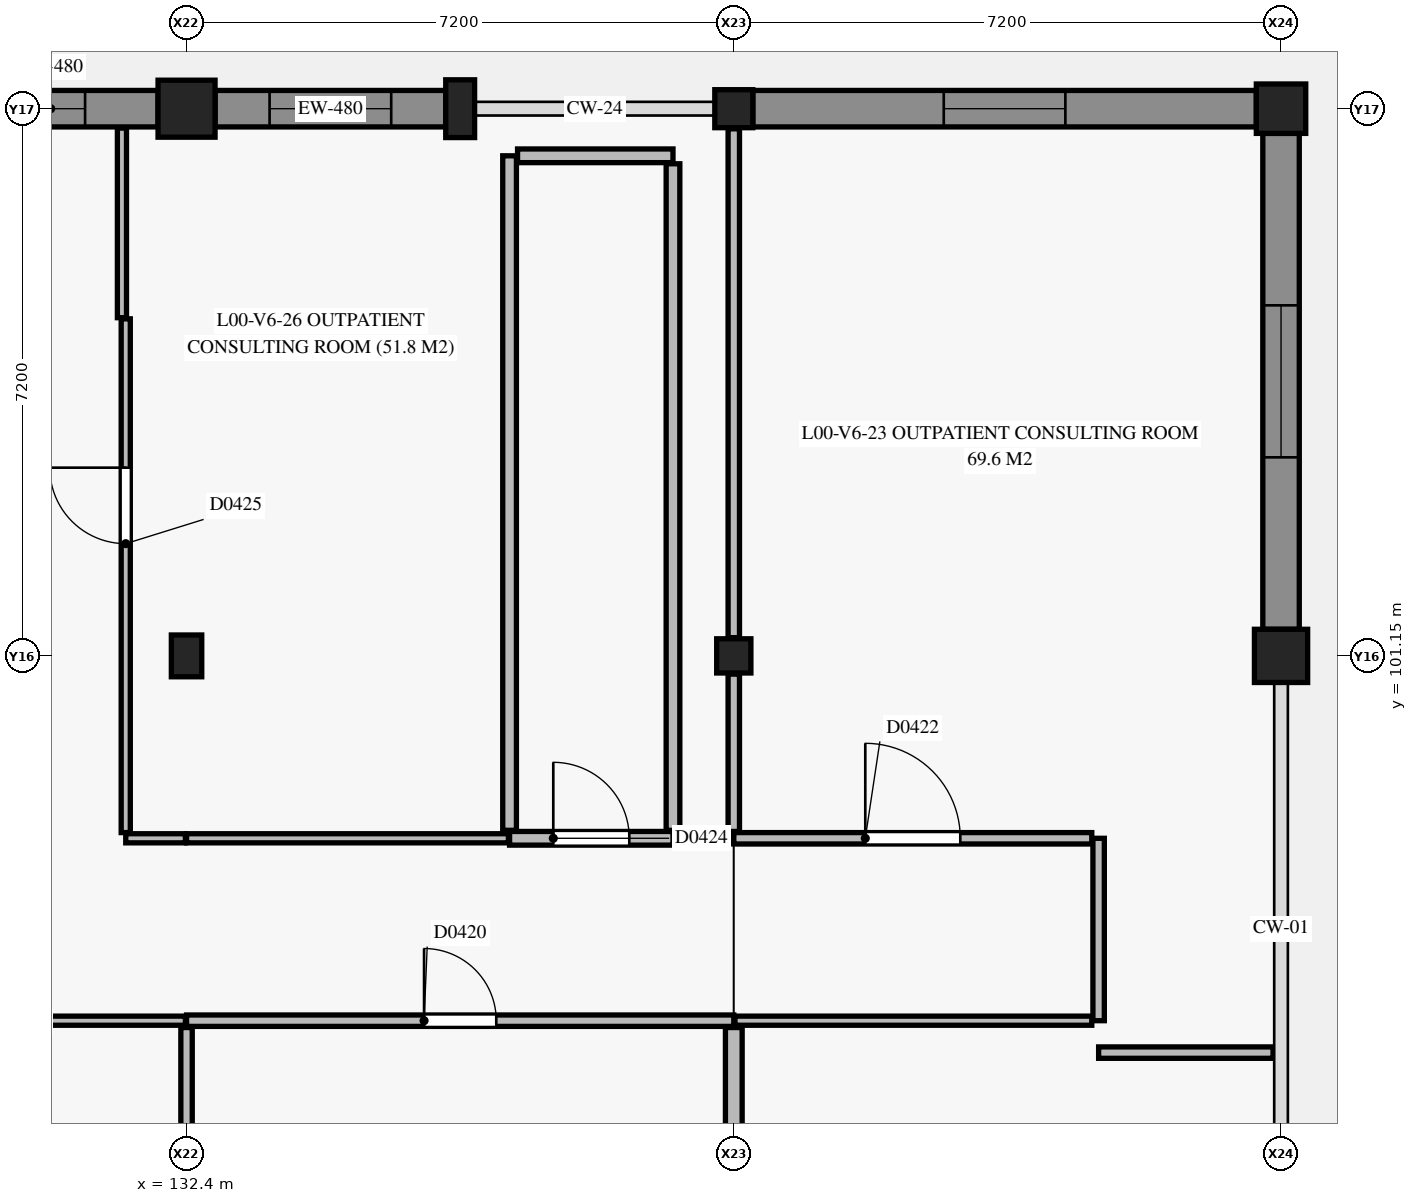
"""IFC4 building model, lengths in metres.
Left out: names, types, materials, properties, quantities, classifications, styles, units other than length and angle.
Written with IfcOpenShell. Run it as: python <this file> out.ifc"""

import sys

from ifc_helpers import new_model, si_unit, direction, frame, frame_2d, origin, origin_2d, place, context, subcontext, project, spatial, rectangle, circle, extrude, element, fill, save


model = new_model("IFC4")
c1 = context("Model", 3, precision=1e-05, world=origin(), true_north=direction((0.0, 1.0)))
c2 = subcontext(c1, "Body", "Model", "MODEL_VIEW")
j1 = project(units=[si_unit("LENGTHUNIT", "METRE"), si_unit("PLANEANGLEUNIT", "RADIAN")], contexts=[c1])
p1 = place(None, origin())
s1 = spatial("IfcSite", under=j1, at=p1, CompositionType="ELEMENT")
p2 = place(p1, origin())
s2 = spatial("IfcBuilding", under=s1, at=p2, CompositionType="ELEMENT")
p3 = place(p2, origin())
s3 = spatial("IfcBuildingStorey", under=s2, at=p3, CompositionType="ELEMENT", Elevation=0.0)
p4 = place(p3, frame((132.4, 101.15, 0.0), z_axis=(0.0, 0.0, 1.0), x_axis=(1.0, 0.0, 0.0)))
e1 = element("IfcColumn", 1, at=p4, inside=s3, PredefinedType="COLUMN", context=c2, shape_type="SweptSolid", body=[
    extrude(rectangle(XDim=0.4, YDim=0.55, at=origin_2d()), origin(), (0.0, 0.0, 1.0), 4.8),
])
p5 = place(p3, frame((132.4, 108.35, 0.0), z_axis=(0.0, 0.0, 1.0), x_axis=(1.0, 0.0, 0.0)))
e2 = element("IfcColumn", 2, at=p5, inside=s3, PredefinedType="COLUMN", context=c2, shape_type="SweptSolid", body=[
    extrude(rectangle(XDim=0.75, YDim=0.75, at=origin_2d()), origin(), (0.0, 0.0, 1.0), 4.8),
])
p6 = place(p3, frame((139.6, 101.15, 0.0), z_axis=(0.0, 0.0, 1.0), x_axis=(1.0, 0.0, 0.0)))
e3 = element("IfcColumn", 3, at=p6, inside=s3, PredefinedType="COLUMN", context=c2, shape_type="SweptSolid", body=[
    extrude(rectangle(XDim=0.45, YDim=0.45, at=origin_2d()), origin(), (0.0, 0.0, 1.0), 4.8),
])
p7 = place(p3, frame((139.6, 108.35, 0.0), z_axis=(0.0, 0.0, 1.0), x_axis=(1.0, 0.0, 0.0)))
e4 = element("IfcColumn", 4, at=p7, inside=s3, PredefinedType="COLUMN", context=c2, shape_type="SweptSolid", body=[
    extrude(circle(Radius=0.25, at=origin_2d()), origin(), (0.0, 0.0, 1.0), 4.8),
])
p8 = place(p3, frame((146.8, 101.15, 0.0), z_axis=(0.0, 0.0, 1.0), x_axis=(1.0, 0.0, 0.0)))
e5 = element("IfcColumn", 5, at=p8, inside=s3, PredefinedType="COLUMN", context=c2, shape_type="SweptSolid", body=[
    extrude(rectangle(XDim=0.7, YDim=0.7, at=origin_2d()), origin(), (0.0, 0.0, 1.0), 4.8),
])
p9 = place(p3, frame((146.8, 108.35, 0.0), z_axis=(0.0, 0.0, 1.0), x_axis=(1.0, 0.0, 0.0)))
e6 = element("IfcColumn", 6, at=p9, inside=s3, PredefinedType="COLUMN", context=c2, shape_type="SweptSolid", body=[
    extrude(rectangle(XDim=0.65, YDim=0.65, at=origin_2d()), origin(), (0.0, 0.0, 1.0), 4.8),
])
p10 = place(p3, frame((136.0, 108.35, 0.0), z_axis=(0.0, 0.0, 1.0), x_axis=(1.0, 0.0, 0.0)))
e7 = element("IfcColumn", 7, at=p10, inside=s3, PredefinedType="PILASTER", context=c2, shape_type="SweptSolid", body=[
    extrude(rectangle(XDim=0.38, YDim=0.76, at=origin_2d()), origin(), (0.0, 0.0, 1.0), 4.8),
])
p11 = place(p3, frame((129.2, 108.35, 0.0), z_axis=(0.0, 0.0, 1.0), x_axis=(1.0, 0.0, 0.0)))
e8 = element("IfcWall", 8, at=p11, inside=s3, PredefinedType="SOLIDWALL", context=c2, shape_type="SweptSolid", body=[
    extrude(rectangle(XDim=2.825, YDim=0.48, at=frame_2d((1.413, 0.0))), origin(), (0.0, 0.0, 1.0), 3.7),
])
p12 = place(p11, frame((0.465, 0.0, 0.9)))
e9 = element("IfcOpeningElement", 9, at=p12, cuts=e8, PredefinedType="OPENING", context=c2, shape_type="SweptSolid", body=[
    extrude(rectangle(XDim=1.4, YDim=1.8, at=frame_2d((0.7, 0.9))), frame((0.0, 0.25, 0.0), z_axis=(0.0, -1.0, 0.0), x_axis=(1.0, 0.0, 0.0)), (0.0, 0.0, 1.0), 0.5),
])
p13 = place(p3, frame((132.775, 108.35, 0.0), z_axis=(0.0, 0.0, 1.0), x_axis=(1.0, 0.0, 0.0)))
e10 = element("IfcWall", 10, at=p13, inside=s3, PredefinedType="SOLIDWALL", context=c2, shape_type="SweptSolid", body=[
    extrude(rectangle(XDim=3.035, YDim=0.48, at=frame_2d((1.518, 0.0))), origin(), (0.0, 0.0, 1.0), 3.7),
])
p14 = place(p13, frame((0.718, 0.0, 0.9)))
e11 = element("IfcOpeningElement", 11, at=p14, cuts=e10, PredefinedType="OPENING", context=c2, shape_type="SweptSolid", body=[
    extrude(rectangle(XDim=1.6, YDim=1.8, at=frame_2d((0.8, 0.9))), frame((0.0, 0.25, 0.0), z_axis=(0.0, -1.0, 0.0), x_axis=(1.0, 0.0, 0.0)), (0.0, 0.0, 1.0), 0.5),
])
p15 = place(p3, frame((139.85, 108.35, 0.0), z_axis=(0.0, 0.0, 1.0), x_axis=(1.0, 0.0, 0.0)))
e12 = element("IfcWall", 12, at=p15, inside=s3, PredefinedType="SOLIDWALL", context=c2, shape_type="SweptSolid", body=[
    extrude(rectangle(XDim=6.625, YDim=0.48, at=frame_2d((3.312, 0.0))), origin(), (0.0, 0.0, 1.0), 3.7),
])
p16 = place(p15, frame((2.512, 0.0, 0.6)))
e13 = element("IfcOpeningElement", 13, at=p16, cuts=e12, PredefinedType="OPENING", context=c2, shape_type="SweptSolid", body=[
    extrude(rectangle(XDim=1.6, YDim=2.2, at=frame_2d((0.8, 1.1))), frame((0.0, 0.25, 0.0), z_axis=(0.0, -1.0, 0.0), x_axis=(1.0, 0.0, 0.0)), (0.0, 0.0, 1.0), 0.5),
])
p17 = place(p3, frame((146.8, 108.025, 0.0), z_axis=(0.0, 0.0, 1.0), x_axis=(0.0, -1.0, 0.0)))
e14 = element("IfcWall", 14, at=p17, inside=s3, PredefinedType="SOLIDWALL", context=c2, shape_type="SweptSolid", body=[
    extrude(rectangle(XDim=6.525, YDim=0.48, at=frame_2d((3.262, 0.0))), origin(), (0.0, 0.0, 1.0), 3.7),
])
p18 = place(p17, frame((2.262, 0.0, 0.6)))
e15 = element("IfcOpeningElement", 15, at=p18, cuts=e14, PredefinedType="OPENING", context=c2, shape_type="SweptSolid", body=[
    extrude(rectangle(XDim=2.0, YDim=2.2, at=frame_2d((1.0, 1.1))), frame((0.0, 0.25, 0.0), z_axis=(0.0, -1.0, 0.0), x_axis=(1.0, 0.0, 0.0)), (0.0, 0.0, 1.0), 0.5),
])
p19 = place(p3, frame((136.65, 98.75, 0.0), z_axis=(0.0, 0.0, 1.0), x_axis=(1.0, 0.0, 0.0)))
e16 = element("IfcWall", 16, at=p19, inside=s3, PredefinedType="PLUMBINGWALL", context=c2, shape_type="SweptSolid", body=[
    extrude(rectangle(XDim=2.15, YDim=0.18, at=frame_2d((1.075, 0.0))), origin(), (0.0, 0.0, 1.0), 4.085),
])
p20 = place(p19, frame((0.575, 0.0, 0.0)))
e17 = element("IfcOpeningElement", 17, at=p20, cuts=e16, PredefinedType="OPENING", context=c2, shape_type="SweptSolid", body=[
    extrude(rectangle(XDim=1.0, YDim=2.15, at=frame_2d((0.5, 1.075))), frame((0.0, 0.1, 0.0), z_axis=(0.0, -1.0, 0.0), x_axis=(1.0, 0.0, 0.0)), (0.0, 0.0, 1.0), 0.2),
])
p21 = place(p3, frame((136.65, 98.855, 0.0), z_axis=(0.0, 0.0, 1.0), x_axis=(0.0, 1.0, 0.0)))
e18 = element("IfcWall", 18, at=p21, inside=s3, PredefinedType="PLUMBINGWALL", context=c2, shape_type="SweptSolid", body=[
    extrude(rectangle(XDim=8.875, YDim=0.18, at=frame_2d((4.438, 0.0))), origin(), (0.0, 0.0, 1.0), 3.985),
])
p22 = place(p3, frame((136.755, 107.73, 0.0), z_axis=(0.0, 0.0, 1.0), x_axis=(1.0, 0.0, 0.0)))
e19 = element("IfcWall", 19, at=p22, inside=s3, PredefinedType="PLUMBINGWALL", context=c2, shape_type="SweptSolid", body=[
    extrude(rectangle(XDim=2.045, YDim=0.18, at=frame_2d((1.022, 0.0))), origin(), (0.0, 0.0, 1.0), 4.52),
])
p23 = place(p3, frame((138.8, 98.855, 0.0), z_axis=(0.0, 0.0, 1.0), x_axis=(0.0, 1.0, 0.0)))
e20 = element("IfcWall", 20, at=p23, inside=s3, PredefinedType="PLUMBINGWALL", context=c2, shape_type="SweptSolid", body=[
    extrude(rectangle(XDim=8.77, YDim=0.18, at=frame_2d((4.385, 0.0))), origin(), (0.0, 0.0, 1.0), 3.985),
])
p24 = place(p3, frame((132.4, 96.35, 0.0), z_axis=(0.0, 0.0, 1.0), x_axis=(1.0, 0.0, 0.0)))
e21 = element("IfcWall", 21, at=p24, inside=s3, PredefinedType="PARTITIONING", context=c2, shape_type="SweptSolid", body=[
    extrude(rectangle(XDim=7.2, YDim=0.15, at=frame_2d((3.6, 0.0))), origin(), (0.0, 0.0, 1.0), 3.705),
])
p25 = place(p24, frame((3.125, 0.0, 0.0)))
e22 = element("IfcOpeningElement", 22, at=p25, cuts=e21, PredefinedType="OPENING", context=c2, shape_type="SweptSolid", body=[
    extrude(rectangle(XDim=0.95, YDim=2.1, at=frame_2d((0.475, 1.05))), frame((0.0, 0.085, 0.0), z_axis=(0.0, -1.0, 0.0), x_axis=(1.0, 0.0, 0.0)), (0.0, 0.0, 1.0), 0.17),
])
p26 = place(p3, frame((144.4, 96.35, 0.0), z_axis=(0.0, 0.0, 1.0), x_axis=(0.0, 1.0, 0.0)))
e23 = element("IfcWall", 23, at=p26, inside=s3, PredefinedType="PARTITIONING", context=c2, shape_type="SweptSolid", body=[
    extrude(rectangle(XDim=2.4, YDim=0.15, at=frame_2d((1.2, 0.0))), origin(), (0.0, 0.0, 1.0), 4.045),
])
p27 = place(p3, frame((139.6, 98.75, 0.0), z_axis=(0.0, 0.0, 1.0), x_axis=(1.0, 0.0, 0.0)))
e24 = element("IfcWall", 24, at=p27, inside=s3, PredefinedType="PARTITIONING", context=c2, shape_type="SweptSolid", body=[
    extrude(rectangle(XDim=4.71, YDim=0.15, at=frame_2d((2.355, 0.0))), origin(), (0.0, 0.0, 1.0), 3.925),
])
p28 = place(p27, frame((1.73, 0.0, 0.0)))
e25 = element("IfcOpeningElement", 25, at=p28, cuts=e24, PredefinedType="OPENING", context=c2, shape_type="SweptSolid", body=[
    extrude(rectangle(XDim=1.25, YDim=2.15, at=frame_2d((0.625, 1.075))), frame((0.0, 0.085, 0.0), z_axis=(0.0, -1.0, 0.0), x_axis=(1.0, 0.0, 0.0)), (0.0, 0.0, 1.0), 0.17),
])
p29 = place(p3, frame((139.615, 96.35, 0.0), z_axis=(0.0, 0.0, 1.0), x_axis=(1.0, 0.0, 0.0)))
e26 = element("IfcWall", 26, at=p29, inside=s3, PredefinedType="PARTITIONING", context=c2, shape_type="SweptSolid", body=[
    extrude(rectangle(XDim=4.695, YDim=0.12, at=frame_2d((2.348, 0.0))), origin(), (0.0, 0.0, 1.0), 3.925),
])
p30 = place(p3, frame((125.215, 96.35, 0.0), z_axis=(0.0, 0.0, 1.0), x_axis=(1.0, 0.0, 0.0)))
e27 = element("IfcWall", 27, at=p30, inside=s3, PredefinedType="PARTITIONING", context=c2, shape_type="SweptSolid", body=[
    extrude(rectangle(XDim=7.17, YDim=0.12, at=frame_2d((3.585, 0.0))), origin(), (0.0, 0.0, 1.0), 3.705),
])
p31 = place(p30, frame((3.085, 0.0, 0.0)))
e28 = element("IfcOpeningElement", 28, at=p31, cuts=e27, PredefinedType="OPENING", context=c2, shape_type="SweptSolid", body=[
    extrude(rectangle(XDim=1.0, YDim=2.15, at=frame_2d((0.5, 1.075))), frame((0.0, 0.07, 0.0), z_axis=(0.0, -1.0, 0.0), x_axis=(1.0, 0.0, 0.0)), (0.0, 0.0, 1.0), 0.14),
])
p32 = place(p3, frame((131.55, 105.6, 0.0), z_axis=(0.0, 0.0, 1.0), x_axis=(0.0, 1.0, 0.0)))
e29 = element("IfcWall", 29, at=p32, inside=s3, PredefinedType="PARTITIONING", context=c2, shape_type="SweptSolid", body=[
    extrude(rectangle(XDim=2.495, YDim=0.12, at=frame_2d((1.248, 0.0))), origin(), (0.0, 0.0, 1.0), 4.52),
])
p33 = place(p3, frame((138.815, 98.75, 0.0), z_axis=(0.0, 0.0, 1.0), x_axis=(1.0, 0.0, 0.0)))
e30 = element("IfcWall", 30, at=p33, inside=s3, PredefinedType="PARTITIONING", context=c2, shape_type="SweptSolid", body=[
    extrude(rectangle(XDim=0.77, YDim=0.12, at=frame_2d((0.385, 0.0))), origin(), (0.0, 0.0, 1.0), 3.925),
])
p34 = place(p3, frame((132.4, 98.75, 0.0), z_axis=(0.0, 0.0, 1.0), x_axis=(1.0, 0.0, 0.0)))
e31 = element("IfcWall", 31, at=p34, inside=s3, PredefinedType="PARTITIONING", context=c2, shape_type="SweptSolid", body=[
    extrude(rectangle(XDim=4.235, YDim=0.12, at=frame_2d((2.118, 0.0))), origin(), (0.0, 0.0, 1.0), 3.705),
])
p35 = place(p3, frame((131.6, 98.75, 0.0), z_axis=(0.0, 0.0, 1.0), x_axis=(1.0, 0.0, 0.0)))
e32 = element("IfcWall", 32, at=p35, inside=s3, PredefinedType="PARTITIONING", context=c2, shape_type="SweptSolid", body=[
    extrude(rectangle(XDim=0.785, YDim=0.12, at=frame_2d((0.393, 0.0))), origin(), (0.0, 0.0, 1.0), 3.705),
])
p36 = place(p3, frame((131.6, 98.825, 0.0), z_axis=(0.0, 0.0, 1.0), x_axis=(0.0, 1.0, 0.0)))
e33 = element("IfcWall", 33, at=p36, inside=s3, PredefinedType="PARTITIONING", context=c2, shape_type="SweptSolid", body=[
    extrude(rectangle(XDim=6.76, YDim=0.12, at=frame_2d((3.38, 0.0))), origin(), (0.0, 0.0, 1.0), 4.52),
])
p37 = place(p36, frame((3.802, 0.0, 0.0)))
e34 = element("IfcOpeningElement", 34, at=p37, cuts=e33, PredefinedType="OPENING", context=c2, shape_type="SweptSolid", body=[
    extrude(rectangle(XDim=1.0, YDim=2.15, at=frame_2d((0.5, 1.075))), frame((0.0, 0.07, 0.0), z_axis=(0.0, -1.0, 0.0), x_axis=(1.0, 0.0, 0.0)), (0.0, 0.0, 1.0), 0.14),
])
p38 = place(p3, frame((139.6, 94.215, 0.0), z_axis=(0.0, 0.0, 1.0), x_axis=(0.0, 1.0, 0.0)))
e35 = element("IfcWall", 35, at=p38, inside=s3, PredefinedType="PARTITIONING", context=c2, shape_type="SweptSolid", body=[
    extrude(rectangle(XDim=2.045, YDim=0.22, at=frame_2d((1.022, 0.0))), origin(), (0.0, 0.0, 1.0), 3.925),
])
p39 = place(p3, frame((144.4, 95.93, 0.0), z_axis=(0.0, 0.0, 1.0), x_axis=(1.0, 0.0, 0.0)))
e36 = element("IfcWall", 36, at=p39, inside=s3, PredefinedType="PARTITIONING", context=c2, shape_type="SweptSolid", body=[
    extrude(rectangle(XDim=2.295, YDim=0.15, at=frame_2d((1.147, 0.0))), origin(), (0.0, 0.0, 1.0), 3.805),
])
p40 = place(p3, frame((132.4, 94.265, 0.0), z_axis=(0.0, 0.0, 1.0), x_axis=(0.0, 1.0, 0.0)))
e37 = element("IfcWall", 37, at=p40, inside=s3, PredefinedType="PARTITIONING", context=c2, shape_type="SweptSolid", body=[
    extrude(rectangle(XDim=1.995, YDim=0.15, at=frame_2d((0.998, 0.0))), origin(), (0.0, 0.0, 1.0), 3.705),
])
p41 = place(p3, frame((139.6, 98.84, 0.0), z_axis=(0.0, 0.0, 1.0), x_axis=(0.0, 1.0, 0.0)))
e38 = element("IfcWall", 38, at=p41, inside=s3, PredefinedType="PARTITIONING", context=c2, shape_type="SweptSolid", body=[
    extrude(rectangle(XDim=2.07, YDim=0.15, at=frame_2d((1.035, 0.0))), origin(), (0.0, 0.0, 1.0), 3.925),
])
p42 = place(p3, frame((139.6, 101.39, 0.0), z_axis=(0.0, 0.0, 1.0), x_axis=(0.0, 1.0, 0.0)))
e39 = element("IfcWall", 39, at=p42, inside=s3, PredefinedType="PARTITIONING", context=c2, shape_type="SweptSolid", body=[
    extrude(rectangle(XDim=6.695, YDim=0.15, at=frame_2d((3.348, 0.0))), origin(), (0.0, 0.0, 1.0), 3.955),
])
p43 = place(p12, origin())
e40 = element("IfcWindow", 40, at=p43, inside=s3, PartitioningType="SINGLE_PANEL", PredefinedType="WINDOW", context=c2, shape_type="SweptSolid", body=[
    extrude(rectangle(XDim=1.4, YDim=1.8, at=frame_2d((0.7, 0.9))), frame((0.0, 0.03, 0.0), z_axis=(0.0, -1.0, 0.0), x_axis=(1.0, 0.0, 0.0)), (0.0, 0.0, 1.0), 0.06),
])
fill(e9, e40)
p44 = place(p14, origin())
e41 = element("IfcWindow", 41, at=p44, inside=s3, PartitioningType="SINGLE_PANEL", PredefinedType="WINDOW", context=c2, shape_type="SweptSolid", body=[
    extrude(rectangle(XDim=1.6, YDim=1.8, at=frame_2d((0.8, 0.9))), frame((0.0, 0.03, 0.0), z_axis=(0.0, -1.0, 0.0), x_axis=(1.0, 0.0, 0.0)), (0.0, 0.0, 1.0), 0.06),
])
fill(e11, e41)
p45 = place(p16, origin())
e42 = element("IfcWindow", 42, at=p45, inside=s3, PartitioningType="SINGLE_PANEL", PredefinedType="WINDOW", context=c2, shape_type="SweptSolid", body=[
    extrude(rectangle(XDim=1.6, YDim=2.2, at=frame_2d((0.8, 1.1))), frame((0.0, 0.03, 0.0), z_axis=(0.0, -1.0, 0.0), x_axis=(1.0, 0.0, 0.0)), (0.0, 0.0, 1.0), 0.06),
])
fill(e13, e42)
p46 = place(p18, origin())
e43 = element("IfcWindow", 43, at=p46, inside=s3, PartitioningType="SINGLE_PANEL", PredefinedType="WINDOW", context=c2, shape_type="SweptSolid", body=[
    extrude(rectangle(XDim=2.0, YDim=2.2, at=frame_2d((1.0, 1.1))), frame((0.0, 0.03, 0.0), z_axis=(0.0, -1.0, 0.0), x_axis=(1.0, 0.0, 0.0)), (0.0, 0.0, 1.0), 0.06),
])
fill(e15, e43)
p47 = place(p25, origin())
e44 = element("IfcDoor", 44, at=p47, inside=s3, OperationType="SINGLE_SWING_LEFT", PredefinedType="DOOR", context=c2, shape_type="SweptSolid", body=[
    extrude(rectangle(XDim=0.95, YDim=2.1, at=frame_2d((0.475, 1.05))), frame((0.0, 0.025, 0.0), z_axis=(0.0, -1.0, 0.0), x_axis=(1.0, 0.0, 0.0)), (0.0, 0.0, 1.0), 0.05),
])
fill(e22, e44)
p48 = place(p28, origin())
e45 = element("IfcDoor", 45, at=p48, inside=s3, OperationType="SINGLE_SWING_LEFT", PredefinedType="DOOR", context=c2, shape_type="SweptSolid", body=[
    extrude(rectangle(XDim=1.25, YDim=2.15, at=frame_2d((0.625, 1.075))), frame((0.0, 0.025, 0.0), z_axis=(0.0, -1.0, 0.0), x_axis=(1.0, 0.0, 0.0)), (0.0, 0.0, 1.0), 0.05),
])
fill(e25, e45)
p49 = place(p20, origin())
e46 = element("IfcDoor", 46, at=p49, inside=s3, OperationType="SINGLE_SWING_LEFT", PredefinedType="DOOR", context=c2, shape_type="SweptSolid", body=[
    extrude(rectangle(XDim=1.0, YDim=2.15, at=frame_2d((0.5, 1.075))), frame((0.0, 0.025, 0.0), z_axis=(0.0, -1.0, 0.0), x_axis=(1.0, 0.0, 0.0)), (0.0, 0.0, 1.0), 0.05),
])
fill(e17, e46)
p50 = place(p37, origin())
e47 = element("IfcDoor", 47, at=p50, inside=s3, OperationType="SINGLE_SWING_RIGHT", PredefinedType="DOOR", context=c2, shape_type="SweptSolid", body=[
    extrude(rectangle(XDim=1.0, YDim=2.15, at=frame_2d((0.5, 1.075))), frame((0.0, 0.025, 0.0), z_axis=(0.0, -1.0, 0.0), x_axis=(1.0, 0.0, 0.0)), (0.0, 0.0, 1.0), 0.05),
])
fill(e34, e47)
save(model, sys.argv[1])
